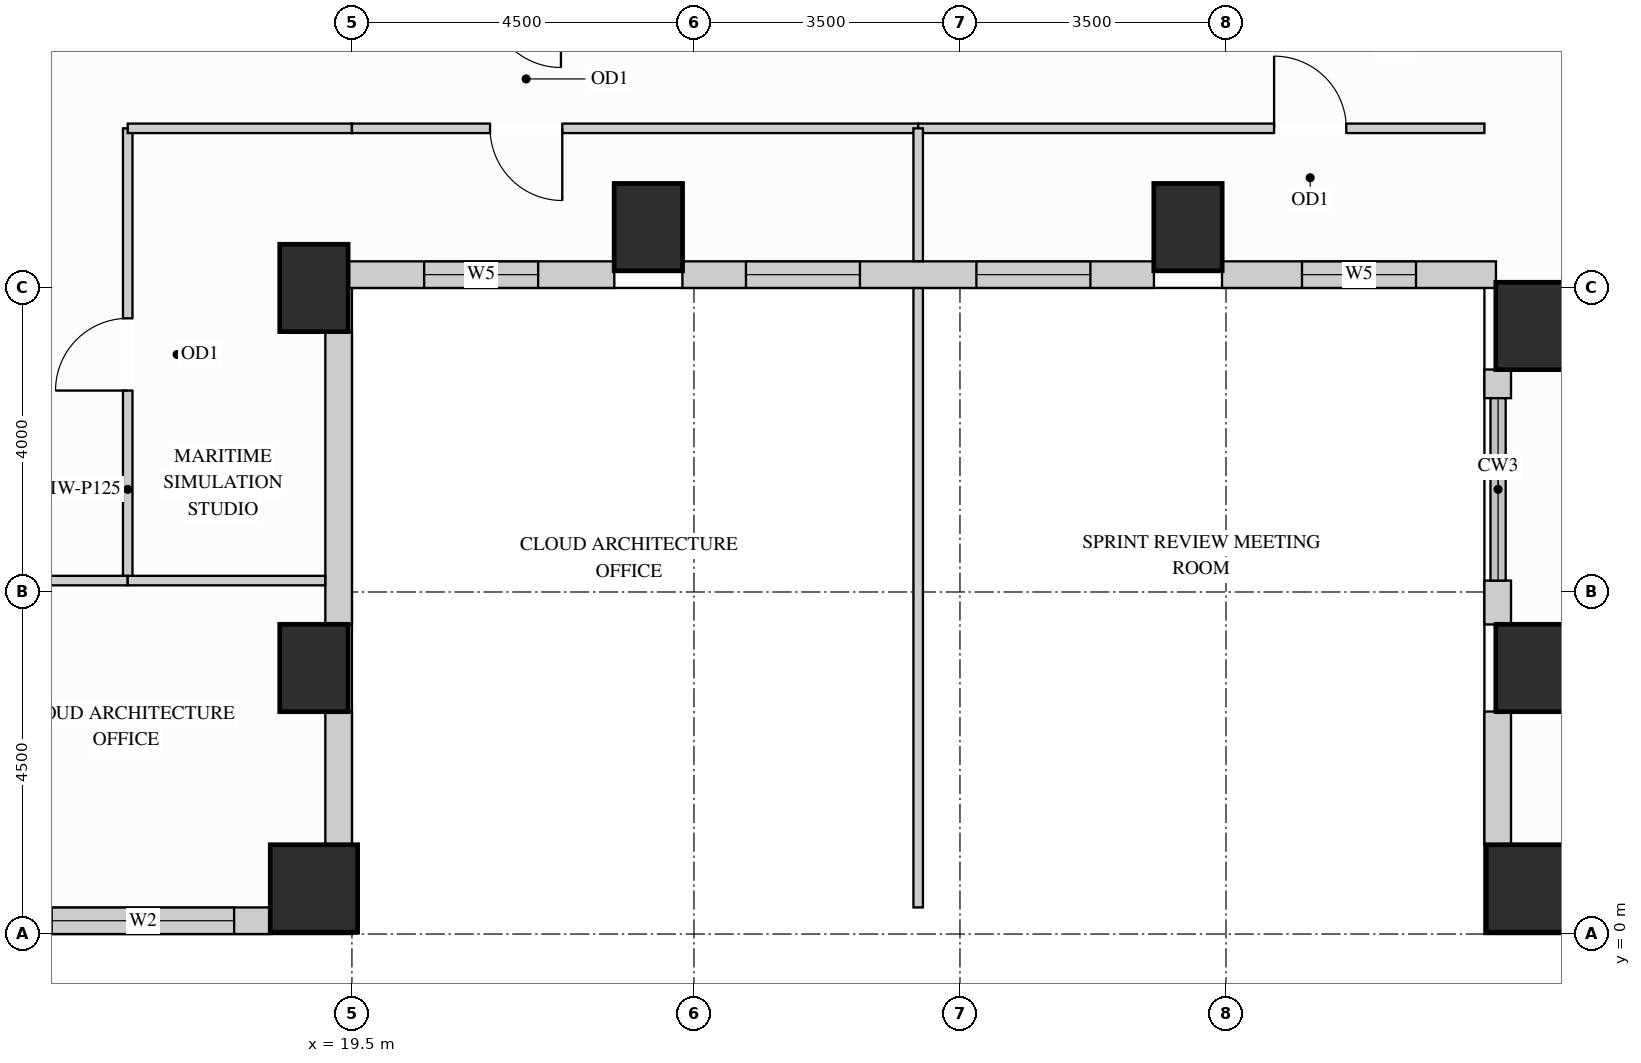
"""IFC4 building model, lengths in metres.
Left out: names, types, materials, properties, quantities, classifications, styles, units other than length and angle.
Written with IfcOpenShell. Run it as: python <this file> out.ifc"""

import sys

from ifc_helpers import new_model, si_unit, direction, frame, frame_2d, origin, origin_2d, place, context, subcontext, project, spatial, rectangle, extrude, source, transform, mapped, element, fill, save


model = new_model("IFC4")
c1 = context("Model", 3, precision=1e-05, world=origin(), true_north=direction((0.0, 1.0)))
c2 = subcontext(c1, "Body", "Model", "MODEL_VIEW")
j1 = project(units=[si_unit("LENGTHUNIT", "METRE"), si_unit("PLANEANGLEUNIT", "RADIAN")], contexts=[c1])
p1 = place(None, origin())
s1 = spatial("IfcSite", under=j1, at=p1, CompositionType="ELEMENT")
p2 = place(p1, origin())
s2 = spatial("IfcBuilding", under=s1, at=p2, CompositionType="ELEMENT")
p3 = place(p2, frame((0.0, 0.0, 102.6)))
s3 = spatial("IfcBuildingStorey", under=s2, at=p3, CompositionType="ELEMENT", Elevation=102.6)
m1 = source(origin(), c2, "Body", "SweptSolid", [
    extrude(rectangle(XDim=0.9, YDim=1.15, at=origin_2d()), origin(), (0.0, 0.0, 1.0), 3.38),
])
for number, where, z_axis, x_axis in (
    (1, (19.0, 3.5, 0.0), (0.0, 0.0, 1.0), (1.0, 0.0, 0.0)),
    (2, (19.0, 8.5, 0.0), (0.0, 0.0, 1.0), (1.0, 0.0, 0.0)),
    (3, (35.0, 3.5, 0.0), (0.0, 0.0, 1.0), (1.0, 0.0, 0.0)),
    (4, (35.0, 8.0, 0.0), (0.0, 0.0, 1.0), (1.0, 0.0, 0.0)),
    (5, (23.4, 9.3, 0.0), (0.0, 0.0, 1.0), (1.0, 0.0, 0.0)),
    (6, (30.5, 9.3, 0.0), (0.0, 0.0, 1.0), (1.0, 0.0, 0.0)),
):
    element("IfcColumn", number, at=place(p3, frame(where, z_axis=z_axis, x_axis=x_axis)), inside=s3, PredefinedType="COLUMN", context=c2, shape_type="MappedRepresentation", body=[
        mapped(m1, transform((0.0, 0.0, 0.0), x_axis=(1.0, 0.0, 0.0), y_axis=(0.0, 1.0, 0.0), z_axis=(0.0, 0.0, 1.0))),
    ])
m2 = source(origin(), c2, "Body", "SweptSolid", [
    extrude(rectangle(XDim=1.15, YDim=1.15, at=origin_2d()), origin(), (0.0, 0.0, 1.0), 3.38),
])
for number, where, z_axis, x_axis in (
    (7, (19.0, 0.6, 0.0), (0.0, 0.0, 1.0), (1.0, 0.0, 0.0)),
    (8, (35.0, 0.6, 0.0), (0.0, 0.0, 1.0), (1.0, 0.0, 0.0)),
):
    element("IfcColumn", number, at=place(p3, frame(where, z_axis=z_axis, x_axis=x_axis)), inside=s3, PredefinedType="COLUMN", context=c2, shape_type="MappedRepresentation", body=[
        mapped(m2, transform((0.0, 0.0, 0.0), x_axis=(1.0, 0.0, 0.0), y_axis=(0.0, 1.0, 0.0), z_axis=(0.0, 0.0, 1.0))),
    ])
p4 = place(p3, frame((15.073, 0.175, 0.0), z_axis=(0.0, 0.0, 1.0), x_axis=(1.0, 0.0, 0.0)))
e9 = element("IfcWall", 9, at=p4, inside=s3, PredefinedType="SOLIDWALL", context=c2, shape_type="SweptSolid", body=[
    extrude(rectangle(XDim=3.354, YDim=0.35, at=frame_2d((1.677, 0.0))), origin(), (0.0, 0.0, 1.0), 3.365),
])
p5 = place(p4, frame((0.477, 0.0, 0.78)))
e10 = element("IfcOpeningElement", 10, at=p5, cuts=e9, PredefinedType="OPENING", context=c2, shape_type="SweptSolid", body=[
    extrude(rectangle(XDim=2.4, YDim=2.1, at=frame_2d((1.2, 1.05))), frame((0.0, 0.185, 0.0), z_axis=(0.0, -1.0, 0.0), x_axis=(1.0, 0.0, 0.0)), (0.0, 0.0, 1.0), 0.37),
])
m3 = source(origin(), c2, "Body", "SweptSolid", [
    extrude(rectangle(XDim=1.754, YDim=0.35, at=frame_2d((0.877, 0.0))), origin(), (0.0, 0.0, 1.0), 2.519),
])
p6 = place(p3, frame((19.325, 1.173, 0.0), z_axis=(0.0, 0.0, 1.0), x_axis=(0.0, 1.0, 0.0)))
e11 = element("IfcWall", 11, at=p6, inside=s3, PredefinedType="SOLIDWALL", context=c2, shape_type="MappedRepresentation", body=[
    mapped(m3, transform((0.0, 0.0, 0.0), x_axis=(1.0, 0.0, 0.0), y_axis=(0.0, 1.0, 0.0), z_axis=(0.0, 0.0, 1.0))),
])
m4 = source(origin(), c2, "Body", "SweptSolid", [
    extrude(rectangle(XDim=3.854, YDim=0.35, at=frame_2d((1.927, 0.0))), origin(), (0.0, 0.0, 1.0), 2.519),
])
p7 = place(p3, frame((19.325, 4.073, 0.0), z_axis=(0.0, 0.0, 1.0), x_axis=(0.0, 1.0, 0.0)))
e12 = element("IfcWall", 12, at=p7, inside=s3, PredefinedType="SOLIDWALL", context=c2, shape_type="MappedRepresentation", body=[
    mapped(m4, transform((0.0, 0.0, 0.0), x_axis=(1.0, 0.0, 0.0), y_axis=(0.0, 1.0, 0.0), z_axis=(0.0, 0.0, 1.0))),
])
p8 = place(p3, frame((19.448, 8.675, 0.0), z_axis=(0.0, 0.0, 1.0), x_axis=(1.0, 0.0, 0.0)))
e13 = element("IfcWall", 13, at=p8, inside=s3, PredefinedType="SOLIDWALL", context=c2, shape_type="SweptSolid", body=[
    extrude(rectangle(XDim=3.504, YDim=0.35, at=frame_2d((1.752, 0.0))), origin(), (0.0, 0.0, 1.0), 3.365),
])
p9 = place(p8, frame((1.002, 0.0, 0.78)))
e14 = element("IfcOpeningElement", 14, at=p9, cuts=e13, PredefinedType="OPENING", context=c2, shape_type="SweptSolid", body=[
    extrude(rectangle(XDim=1.5, YDim=2.0, at=frame_2d((0.75, 1.0))), frame((0.0, 0.185, 0.0), z_axis=(0.0, -1.0, 0.0), x_axis=(1.0, 0.0, 0.0)), (0.0, 0.0, 1.0), 0.37),
])
p10 = place(p3, frame((23.848, 8.675, 0.0), z_axis=(0.0, 0.0, 1.0), x_axis=(1.0, 0.0, 0.0)))
e15 = element("IfcWall", 15, at=p10, inside=s3, PredefinedType="SOLIDWALL", context=c2, shape_type="SweptSolid", body=[
    extrude(rectangle(XDim=6.204, YDim=0.35, at=frame_2d((3.102, 0.0))), origin(), (0.0, 0.0, 1.0), 3.365),
])
p11 = place(p10, frame((0.836, 0.0, 0.78)))
e16 = element("IfcOpeningElement", 16, at=p11, cuts=e15, PredefinedType="OPENING", context=c2, shape_type="SweptSolid", body=[
    extrude(rectangle(XDim=1.5, YDim=2.0, at=frame_2d((0.75, 1.0))), frame((0.0, 0.185, 0.0), z_axis=(0.0, -1.0, 0.0), x_axis=(1.0, 0.0, 0.0)), (0.0, 0.0, 1.0), 0.37),
])
p12 = place(p10, frame((3.868, 0.0, 0.78)))
e17 = element("IfcOpeningElement", 17, at=p12, cuts=e15, PredefinedType="OPENING", context=c2, shape_type="SweptSolid", body=[
    extrude(rectangle(XDim=1.5, YDim=2.0, at=frame_2d((0.75, 1.0))), frame((0.0, 0.185, 0.0), z_axis=(0.0, -1.0, 0.0), x_axis=(1.0, 0.0, 0.0)), (0.0, 0.0, 1.0), 0.37),
])
p13 = place(p3, frame((30.948, 8.675, 0.0), z_axis=(0.0, 0.0, 1.0), x_axis=(1.0, 0.0, 0.0)))
e18 = element("IfcWall", 18, at=p13, inside=s3, PredefinedType="SOLIDWALL", context=c2, shape_type="SweptSolid", body=[
    extrude(rectangle(XDim=3.604, YDim=0.35, at=frame_2d((1.802, 0.0))), origin(), (0.0, 0.0, 1.0), 3.365),
])
p14 = place(p13, frame((1.052, 0.0, 0.78)))
e19 = element("IfcOpeningElement", 19, at=p14, cuts=e18, PredefinedType="OPENING", context=c2, shape_type="SweptSolid", body=[
    extrude(rectangle(XDim=1.5, YDim=2.0, at=frame_2d((0.75, 1.0))), frame((0.0, 0.185, 0.0), z_axis=(0.0, -1.0, 0.0), x_axis=(1.0, 0.0, 0.0)), (0.0, 0.0, 1.0), 0.37),
])
m5 = source(origin(), c2, "Body", "SweptSolid", [
    extrude(rectangle(XDim=0.377, YDim=0.35, at=frame_2d((0.188, 0.0))), origin(), (0.0, 0.0, 1.0), 3.365),
])
p15 = place(p3, frame((34.575, 7.427, 0.0), z_axis=(0.0, 0.0, 1.0), x_axis=(0.0, -1.0, 0.0)))
e20 = element("IfcWall", 20, at=p15, inside=s3, PredefinedType="SOLIDWALL", context=c2, shape_type="MappedRepresentation", body=[
    mapped(m5, transform((0.0, 0.0, 0.0), x_axis=(1.0, 0.0, 0.0), y_axis=(0.0, 1.0, 0.0), z_axis=(0.0, 0.0, 1.0))),
])
m6 = source(origin(), c2, "Body", "SweptSolid", [
    extrude(rectangle(XDim=0.577, YDim=0.35, at=frame_2d((0.289, 0.0))), origin(), (0.0, 0.0, 1.0), 3.365),
])
p16 = place(p3, frame((34.575, 4.65, 0.0), z_axis=(0.0, 0.0, 1.0), x_axis=(0.0, -1.0, 0.0)))
e21 = element("IfcWall", 21, at=p16, inside=s3, PredefinedType="SOLIDWALL", context=c2, shape_type="MappedRepresentation", body=[
    mapped(m6, transform((0.0, 0.0, 0.0), x_axis=(1.0, 0.0, 0.0), y_axis=(0.0, 1.0, 0.0), z_axis=(0.0, 0.0, 1.0))),
])
m7 = source(origin(), c2, "Body", "SweptSolid", [
    extrude(rectangle(XDim=1.754, YDim=0.35, at=frame_2d((0.877, 0.0))), origin(), (0.0, 0.0, 1.0), 3.365),
])
p17 = place(p3, frame((34.575, 2.927, 0.0), z_axis=(0.0, 0.0, 1.0), x_axis=(0.0, -1.0, 0.0)))
e22 = element("IfcWall", 22, at=p17, inside=s3, PredefinedType="SOLIDWALL", context=c2, shape_type="MappedRepresentation", body=[
    mapped(m7, transform((0.0, 0.0, 0.0), x_axis=(1.0, 0.0, 0.0), y_axis=(0.0, 1.0, 0.0), z_axis=(0.0, 0.0, 1.0))),
])
p18 = place(p3, frame((16.55, 4.65, 0.0), z_axis=(0.0, 0.0, 1.0), x_axis=(0.0, 1.0, 0.0)))
e23 = element("IfcWall", 23, at=p18, inside=s3, PredefinedType="PARTITIONING", context=c2, shape_type="SweptSolid", body=[
    extrude(rectangle(XDim=5.95, YDim=0.125, at=frame_2d((2.975, 0.0))), origin(), (0.0, 0.0, 1.0), 3.365),
])
p19 = place(p18, frame((2.5, 0.0, 0.0)))
e24 = element("IfcOpeningElement", 24, at=p19, cuts=e23, PredefinedType="OPENING", context=c2, shape_type="SweptSolid", body=[
    extrude(rectangle(XDim=0.95, YDim=2.15, at=frame_2d((0.475, 1.075))), frame((0.0, 0.073, 0.0), z_axis=(0.0, -1.0, 0.0), x_axis=(1.0, 0.0, 0.0)), (0.0, 0.0, 1.0), 0.145),
])
m8 = source(origin(), c2, "Body", "SweptSolid", [
    extrude(rectangle(XDim=2.95, YDim=0.125, at=frame_2d((1.475, 0.0))), origin(), (0.0, 0.0, 1.0), 3.365),
])
p20 = place(p3, frame((16.55, 10.6, 0.0), z_axis=(0.0, 0.0, 1.0), x_axis=(1.0, 0.0, 0.0)))
e25 = element("IfcWall", 25, at=p20, inside=s3, PredefinedType="PARTITIONING", context=c2, shape_type="MappedRepresentation", body=[
    mapped(m8, transform((0.0, 0.0, 0.0), x_axis=(1.0, 0.0, 0.0), y_axis=(0.0, 1.0, 0.0), z_axis=(0.0, 0.0, 1.0))),
])
p21 = place(p3, frame((19.5, 10.6, 0.0), z_axis=(0.0, 0.0, 1.0), x_axis=(1.0, 0.0, 0.0)))
e26 = element("IfcWall", 26, at=p21, inside=s3, PredefinedType="PARTITIONING", context=c2, shape_type="SweptSolid", body=[
    extrude(rectangle(XDim=7.45, YDim=0.125, at=frame_2d((3.725, 0.0))), origin(), (0.0, 0.0, 1.0), 3.365),
])
p22 = place(p21, frame((1.817, 0.0, 0.0)))
e27 = element("IfcOpeningElement", 27, at=p22, cuts=e26, PredefinedType="OPENING", context=c2, shape_type="SweptSolid", body=[
    extrude(rectangle(XDim=0.95, YDim=2.15, at=frame_2d((0.475, 1.075))), frame((0.0, 0.073, 0.0), z_axis=(0.0, -1.0, 0.0), x_axis=(1.0, 0.0, 0.0)), (0.0, 0.0, 1.0), 0.145),
])
p23 = place(p3, frame((26.95, 10.6, 0.0), z_axis=(0.0, 0.0, 1.0), x_axis=(1.0, 0.0, 0.0)))
e28 = element("IfcWall", 28, at=p23, inside=s3, PredefinedType="PARTITIONING", context=c2, shape_type="SweptSolid", body=[
    extrude(rectangle(XDim=7.45, YDim=0.125, at=frame_2d((3.725, 0.0))), origin(), (0.0, 0.0, 1.0), 3.365),
])
p24 = place(p23, frame((4.683, 0.0, 0.0)))
e29 = element("IfcOpeningElement", 29, at=p24, cuts=e28, PredefinedType="OPENING", context=c2, shape_type="SweptSolid", body=[
    extrude(rectangle(XDim=0.95, YDim=2.15, at=frame_2d((0.475, 1.075))), frame((0.0, 0.073, 0.0), z_axis=(0.0, -1.0, 0.0), x_axis=(1.0, 0.0, 0.0)), (0.0, 0.0, 1.0), 0.145),
])
m9 = source(origin(), c2, "Body", "SweptSolid", [
    extrude(rectangle(XDim=8.148, YDim=0.125, at=frame_2d((4.074, 0.0))), origin(), (0.0, 0.0, 1.0), 3.365),
])
p25 = place(p3, frame((26.95, 0.35, 0.0), z_axis=(0.0, 0.0, 1.0), x_axis=(0.0, 1.0, 0.0)))
e30 = element("IfcWall", 30, at=p25, inside=s3, PredefinedType="PARTITIONING", context=c2, shape_type="MappedRepresentation", body=[
    mapped(m9, transform((0.0, 0.0, 0.0), x_axis=(1.0, 0.0, 0.0), y_axis=(0.0, 1.0, 0.0), z_axis=(0.0, 0.0, 1.0))),
])
m10 = source(origin(), c2, "Body", "SweptSolid", [
    extrude(rectangle(XDim=1.748, YDim=0.125, at=frame_2d((0.874, 0.0))), origin(), (0.0, 0.0, 1.0), 3.365),
])
p26 = place(p3, frame((26.95, 8.852, 0.0), z_axis=(0.0, 0.0, 1.0), x_axis=(0.0, 1.0, 0.0)))
e31 = element("IfcWall", 31, at=p26, inside=s3, PredefinedType="PARTITIONING", context=c2, shape_type="MappedRepresentation", body=[
    mapped(m10, transform((0.0, 0.0, 0.0), x_axis=(1.0, 0.0, 0.0), y_axis=(0.0, 1.0, 0.0), z_axis=(0.0, 0.0, 1.0))),
])
p27 = place(p3, frame((10.544, 4.65, 0.0), z_axis=(0.0, 0.0, 1.0), x_axis=(1.0, 0.0, 0.0)))
e32 = element("IfcWall", 32, at=p27, inside=s3, PredefinedType="PARTITIONING", context=c2, shape_type="SweptSolid", body=[
    extrude(rectangle(XDim=6.006, YDim=0.125, at=frame_2d((3.003, 0.0))), origin(), (0.0, 0.0, 1.0), 2.828),
])
p28 = place(p27, frame((2.528, 0.0, 0.0)))
e33 = element("IfcOpeningElement", 33, at=p28, cuts=e32, PredefinedType="OPENING", context=c2, shape_type="SweptSolid", body=[
    extrude(rectangle(XDim=0.95, YDim=2.15, at=frame_2d((0.475, 1.075))), frame((0.0, 0.073, 0.0), z_axis=(0.0, -1.0, 0.0), x_axis=(1.0, 0.0, 0.0)), (0.0, 0.0, 1.0), 0.145),
])
m11 = source(origin(), c2, "Body", "SweptSolid", [
    extrude(rectangle(XDim=2.598, YDim=0.125, at=frame_2d((1.299, 0.0))), origin(), (0.0, 0.0, 1.0), 2.828),
])
p29 = place(p3, frame((16.55, 4.65, 0.0), z_axis=(0.0, 0.0, 1.0), x_axis=(1.0, 0.0, 0.0)))
e34 = element("IfcWall", 34, at=p29, inside=s3, PredefinedType="PARTITIONING", context=c2, shape_type="MappedRepresentation", body=[
    mapped(m11, transform((0.0, 0.0, 0.0), x_axis=(1.0, 0.0, 0.0), y_axis=(0.0, 1.0, 0.0), z_axis=(0.0, 0.0, 1.0))),
])
m12 = source(origin(), c2, "Body", "SweptSolid", [
    extrude(rectangle(XDim=0.95, YDim=2.15, at=frame_2d((0.475, 1.075))), frame((0.0, 0.025, 0.0), z_axis=(0.0, -1.0, 0.0), x_axis=(1.0, 0.0, 0.0)), (0.0, 0.0, 1.0), 0.05),
])
p30 = place(p19, origin())
e35 = element("IfcDoor", 35, at=p30, inside=s3, OperationType="SINGLE_SWING_LEFT", PredefinedType="DOOR", context=c2, shape_type="MappedRepresentation", body=[
    mapped(m12, transform((0.0, 0.0, 0.0), x_axis=(1.0, 0.0, 0.0), y_axis=(0.0, 1.0, 0.0), z_axis=(0.0, 0.0, 1.0))),
])
fill(e24, e35)
p31 = place(p22, origin())
e36 = element("IfcDoor", 36, at=p31, inside=s3, OperationType="SINGLE_SWING_RIGHT", PredefinedType="DOOR", context=c2, shape_type="MappedRepresentation", body=[
    mapped(m12, transform((0.0, 0.0, 0.0), x_axis=(1.0, 0.0, 0.0), y_axis=(0.0, 1.0, 0.0), z_axis=(0.0, 0.0, 1.0))),
])
fill(e27, e36)
p32 = place(p24, origin())
e37 = element("IfcDoor", 37, at=p32, inside=s3, OperationType="SINGLE_SWING_LEFT", PredefinedType="DOOR", context=c2, shape_type="MappedRepresentation", body=[
    mapped(m12, transform((0.0, 0.0, 0.0), x_axis=(1.0, 0.0, 0.0), y_axis=(0.0, 1.0, 0.0), z_axis=(0.0, 0.0, 1.0))),
])
fill(e29, e37)
m13 = source(origin(), c2, "Body", "SweptSolid", [
    extrude(rectangle(XDim=2.4, YDim=2.1, at=frame_2d((1.2, 1.05))), frame((0.0, 0.03, 0.0), z_axis=(0.0, -1.0, 0.0), x_axis=(1.0, 0.0, 0.0)), (0.0, 0.0, 1.0), 0.06),
])
p33 = place(p5, origin())
e38 = element("IfcWindow", 38, at=p33, inside=s3, PartitioningType="SINGLE_PANEL", PredefinedType="WINDOW", context=c2, shape_type="MappedRepresentation", body=[
    mapped(m13, transform((0.0, 0.0, 0.0), x_axis=(1.0, 0.0, 0.0), y_axis=(0.0, 1.0, 0.0), z_axis=(0.0, 0.0, 1.0))),
])
fill(e10, e38)
m14 = source(origin(), c2, "Body", "SweptSolid", [
    extrude(rectangle(XDim=1.5, YDim=2.0, at=frame_2d((0.75, 1.0))), frame((0.0, 0.03, 0.0), z_axis=(0.0, -1.0, 0.0), x_axis=(1.0, 0.0, 0.0)), (0.0, 0.0, 1.0), 0.06),
])
p34 = place(p9, origin())
e39 = element("IfcWindow", 39, at=p34, inside=s3, PartitioningType="SINGLE_PANEL", PredefinedType="WINDOW", context=c2, shape_type="MappedRepresentation", body=[
    mapped(m14, transform((0.0, 0.0, 0.0), x_axis=(1.0, 0.0, 0.0), y_axis=(0.0, 1.0, 0.0), z_axis=(0.0, 0.0, 1.0))),
])
fill(e14, e39)
p35 = place(p11, origin())
e40 = element("IfcWindow", 40, at=p35, inside=s3, PartitioningType="SINGLE_PANEL", PredefinedType="WINDOW", context=c2, shape_type="MappedRepresentation", body=[
    mapped(m14, transform((0.0, 0.0, 0.0), x_axis=(1.0, 0.0, 0.0), y_axis=(0.0, 1.0, 0.0), z_axis=(0.0, 0.0, 1.0))),
])
fill(e16, e40)
p36 = place(p12, origin())
e41 = element("IfcWindow", 41, at=p36, inside=s3, PartitioningType="SINGLE_PANEL", PredefinedType="WINDOW", context=c2, shape_type="MappedRepresentation", body=[
    mapped(m14, transform((0.0, 0.0, 0.0), x_axis=(1.0, 0.0, 0.0), y_axis=(0.0, 1.0, 0.0), z_axis=(0.0, 0.0, 1.0))),
])
fill(e17, e41)
p37 = place(p14, origin())
e42 = element("IfcWindow", 42, at=p37, inside=s3, PartitioningType="SINGLE_PANEL", PredefinedType="WINDOW", context=c2, shape_type="MappedRepresentation", body=[
    mapped(m14, transform((0.0, 0.0, 0.0), x_axis=(1.0, 0.0, 0.0), y_axis=(0.0, 1.0, 0.0), z_axis=(0.0, 0.0, 1.0))),
])
fill(e19, e42)
save(model, sys.argv[1])
